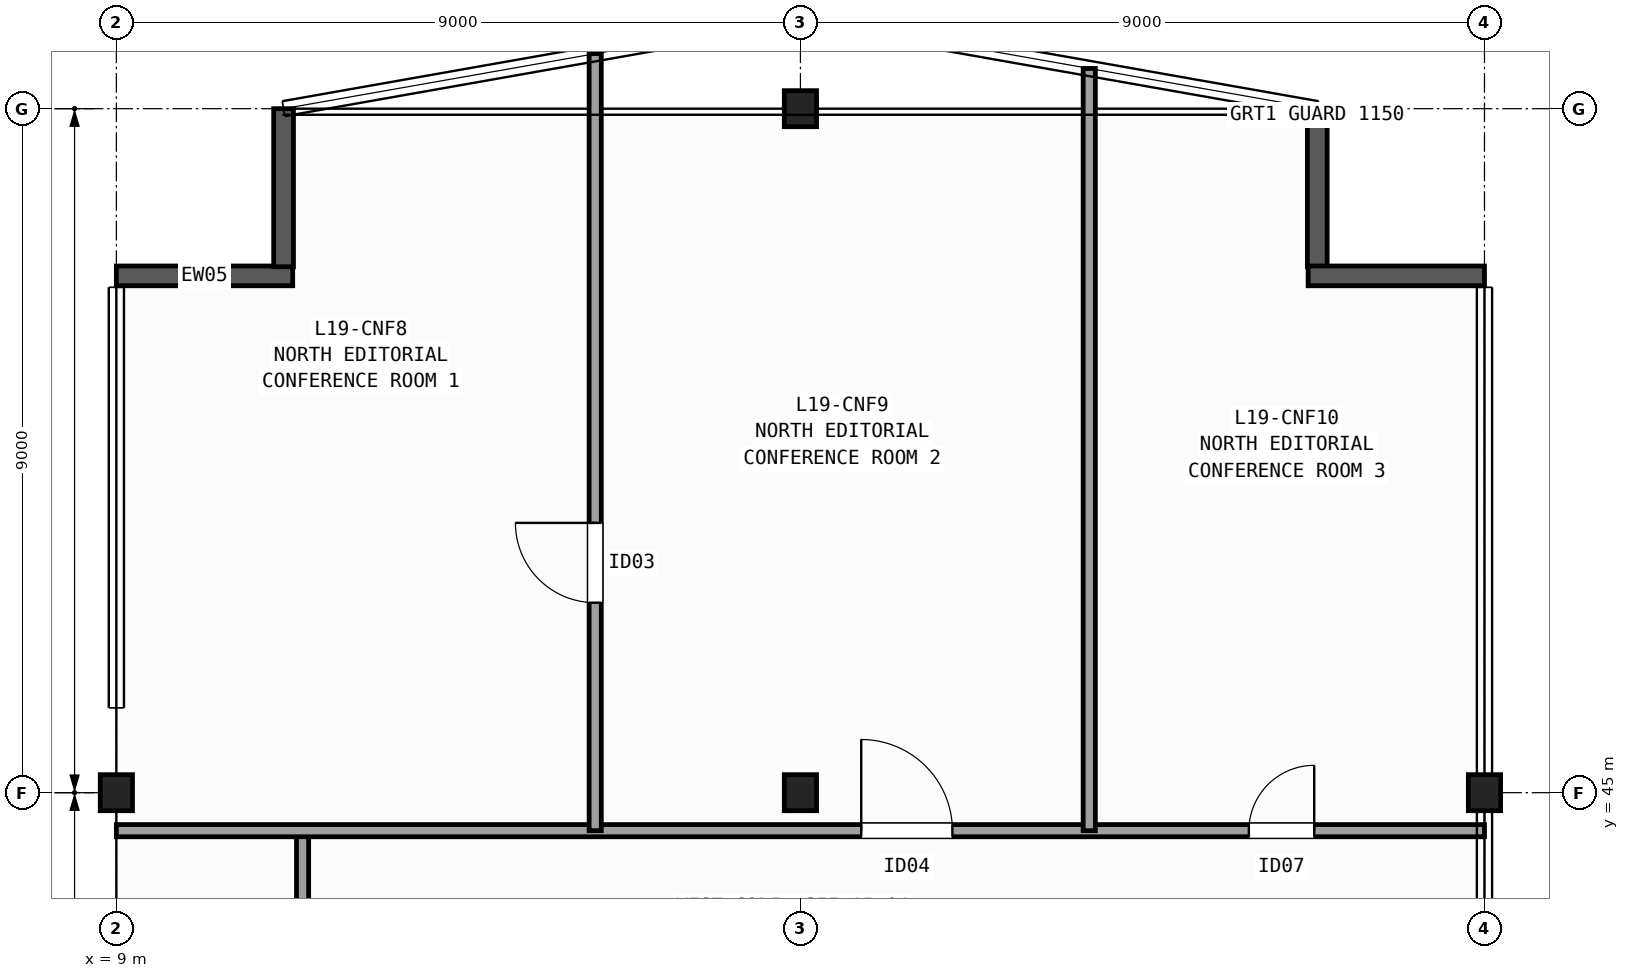
"""IFC4 building model, lengths in metres.
Left out: names, types, materials, properties, quantities, classifications, styles, units other than length and angle.
Written with IfcOpenShell. Run it as: python <this file> out.ifc"""

import sys

from ifc_helpers import new_model, si_unit, direction, frame, frame_2d, origin, origin_2d, place, context, subcontext, project, spatial, rectangle, i_section, extrude, element, fill, save


model = new_model("IFC4")
c1 = context("Model", 3, precision=1e-05, world=origin(), true_north=direction((0.0, 1.0)))
c2 = subcontext(c1, "Body", "Model", "MODEL_VIEW")
j1 = project(units=[si_unit("LENGTHUNIT", "METRE"), si_unit("PLANEANGLEUNIT", "RADIAN")], contexts=[c1])
p1 = place(None, origin())
s1 = spatial("IfcSite", under=j1, at=p1, CompositionType="ELEMENT")
p2 = place(p1, origin())
s2 = spatial("IfcBuilding", under=s1, at=p2, CompositionType="ELEMENT")
p3 = place(p2, frame((0.0, 0.0, 80.4)))
s3 = spatial("IfcBuildingStorey", under=s2, at=p3, CompositionType="ELEMENT", Elevation=80.4)
for number, where, z_axis, x_axis in (
    (1, (9.0, 45.0, 0.0), (0.0, 0.0, 1.0), (1.0, 0.0, 0.0)),
    (2, (18.0, 45.0, 0.0), (0.0, 0.0, 1.0), (1.0, 0.0, 0.0)),
    (3, (18.0, 54.0, 0.0), (0.0, 0.0, 1.0), (1.0, 0.0, 0.0)),
    (4, (27.0, 45.0, 0.0), (0.0, 0.0, 1.0), (1.0, 0.0, 0.0)),
):
    element("IfcColumn", number, at=place(p3, frame(where, z_axis=z_axis, x_axis=x_axis)), inside=s3, PredefinedType="COLUMN", context=c2, shape_type="SweptSolid", body=[
        extrude(i_section(OverallWidth=0.424, OverallDepth=0.474, WebThickness=0.048, FlangeThickness=0.077, FilletRadius=0.015, at=origin_2d()), origin(), (0.0, 0.0, 1.0), 3.7),
    ])
p4 = place(p3, frame((9.0, 51.8, 0.0), z_axis=(0.0, 0.0, 1.0), x_axis=(1.0, 0.0, 0.0)))
e5 = element("IfcWall", 5, at=p4, inside=s3, PredefinedType="SOLIDWALL", context=c2, shape_type="SweptSolid", body=[
    extrude(rectangle(XDim=2.32, YDim=0.26, at=frame_2d((1.16, 0.0))), origin(), (0.0, 0.0, 1.0), 3.37),
])
for number, where, z_axis, x_axis in (
    (6, (11.2, 51.92, 0.0), (0.0, 0.0, 1.0), (0.0, 1.0, 0.0)),
    (7, (24.8, 54.0, 0.0), (0.0, 0.0, 1.0), (0.0, -1.0, 0.0)),
):
    element("IfcWall", number, at=place(p3, frame(where, z_axis=z_axis, x_axis=x_axis)), inside=s3, PredefinedType="SOLIDWALL", context=c2, shape_type="SweptSolid", body=[
        extrude(rectangle(XDim=2.08, YDim=0.26, at=frame_2d((1.04, 0.0))), origin(), (0.0, 0.0, 1.0), 3.37),
    ])
p5 = place(p3, frame((24.68, 51.8, 0.0), z_axis=(0.0, 0.0, 1.0), x_axis=(1.0, 0.0, 0.0)))
e8 = element("IfcWall", 8, at=p5, inside=s3, PredefinedType="SOLIDWALL", context=c2, shape_type="SweptSolid", body=[
    extrude(rectangle(XDim=2.32, YDim=0.26, at=frame_2d((1.16, 0.0))), origin(), (0.0, 0.0, 1.0), 3.37),
])
p6 = place(p3, frame((11.45, 42.4, 0.0), z_axis=(0.0, 0.0, 1.0), x_axis=(0.0, 1.0, 0.0)))
e9 = element("IfcWall", 9, at=p6, inside=s3, PredefinedType="PARTITIONING", context=c2, shape_type="SweptSolid", body=[
    extrude(rectangle(XDim=2.1, YDim=0.16, at=frame_2d((1.05, 0.0))), origin(), (0.0, 0.0, 1.0), 3.37),
])
p7 = place(p3, frame((9.0, 44.5, 0.0), z_axis=(0.0, 0.0, 1.0), x_axis=(1.0, 0.0, 0.0)))
e10 = element("IfcWall", 10, at=p7, inside=s3, PredefinedType="PARTITIONING", context=c2, shape_type="SweptSolid", body=[
    extrude(rectangle(XDim=18.0, YDim=0.16, at=frame_2d((9.0, 0.0))), origin(), (0.0, 0.0, 1.0), 2.577),
])
p8 = place(p7, frame((9.8, 0.0, 0.0)))
e11 = element("IfcOpeningElement", 11, at=p8, cuts=e10, PredefinedType="OPENING", context=c2, shape_type="SweptSolid", body=[
    extrude(rectangle(XDim=1.2, YDim=2.15, at=frame_2d((0.6, 1.075))), frame((0.0, 0.09, 0.0), z_axis=(0.0, -1.0, 0.0), x_axis=(1.0, 0.0, 0.0)), (0.0, 0.0, 1.0), 0.18),
])
p9 = place(p7, frame((14.9, 0.0, 0.0)))
e12 = element("IfcOpeningElement", 12, at=p9, cuts=e10, PredefinedType="OPENING", context=c2, shape_type="SweptSolid", body=[
    extrude(rectangle(XDim=0.86, YDim=2.05, at=frame_2d((0.43, 1.025))), frame((0.0, 0.09, 0.0), z_axis=(0.0, -1.0, 0.0), x_axis=(1.0, 0.0, 0.0)), (0.0, 0.0, 1.0), 0.18),
])
p10 = place(p3, frame((15.3, 44.5, 0.0), z_axis=(0.0, 0.0, 1.0), x_axis=(0.0, 1.0, 0.0)))
e13 = element("IfcWall", 13, at=p10, inside=s3, PredefinedType="PARTITIONING", context=c2, shape_type="SweptSolid", body=[
    extrude(rectangle(XDim=10.224, YDim=0.16, at=frame_2d((5.112, 0.0))), origin(), (0.0, 0.0, 1.0), 2.739),
])
p11 = place(p10, frame((3.0, 0.0, 0.0)))
e14 = element("IfcOpeningElement", 14, at=p11, cuts=e13, PredefinedType="OPENING", context=c2, shape_type="SweptSolid", body=[
    extrude(rectangle(XDim=1.05, YDim=2.15, at=frame_2d((0.525, 1.075))), frame((0.0, 0.09, 0.0), z_axis=(0.0, -1.0, 0.0), x_axis=(1.0, 0.0, 0.0)), (0.0, 0.0, 1.0), 0.18),
])
p12 = place(p3, frame((21.8, 44.5, 0.0), z_axis=(0.0, 0.0, 1.0), x_axis=(0.0, 1.0, 0.0)))
e15 = element("IfcWall", 15, at=p12, inside=s3, PredefinedType="PARTITIONING", context=c2, shape_type="SweptSolid", body=[
    extrude(rectangle(XDim=10.029, YDim=0.16, at=frame_2d((5.015, 0.0))), origin(), (0.0, 0.0, 1.0), 2.739),
])
p13 = place(p11, origin())
e16 = element("IfcDoor", 16, at=p13, inside=s3, OperationType="SINGLE_SWING_RIGHT", PredefinedType="DOOR", context=c2, shape_type="SweptSolid", body=[
    extrude(rectangle(XDim=1.05, YDim=2.15, at=frame_2d((0.525, 1.075))), frame((0.0, 0.025, 0.0), z_axis=(0.0, -1.0, 0.0), x_axis=(1.0, 0.0, 0.0)), (0.0, 0.0, 1.0), 0.05),
])
fill(e14, e16)
p14 = place(p8, origin())
e17 = element("IfcDoor", 17, at=p14, inside=s3, OperationType="SINGLE_SWING_LEFT", PredefinedType="DOOR", context=c2, shape_type="SweptSolid", body=[
    extrude(rectangle(XDim=1.2, YDim=2.15, at=frame_2d((0.6, 1.075))), frame((0.0, 0.025, 0.0), z_axis=(0.0, -1.0, 0.0), x_axis=(1.0, 0.0, 0.0)), (0.0, 0.0, 1.0), 0.05),
])
fill(e11, e17)
p15 = place(p9, origin())
e18 = element("IfcDoor", 18, at=p15, inside=s3, OperationType="SINGLE_SWING_RIGHT", PredefinedType="DOOR", context=c2, shape_type="SweptSolid", body=[
    extrude(rectangle(XDim=0.86, YDim=2.05, at=frame_2d((0.43, 1.025))), frame((0.0, 0.025, 0.0), z_axis=(0.0, -1.0, 0.0), x_axis=(1.0, 0.0, 0.0)), (0.0, 0.0, 1.0), 0.05),
])
fill(e12, e18)
save(model, sys.argv[1])
